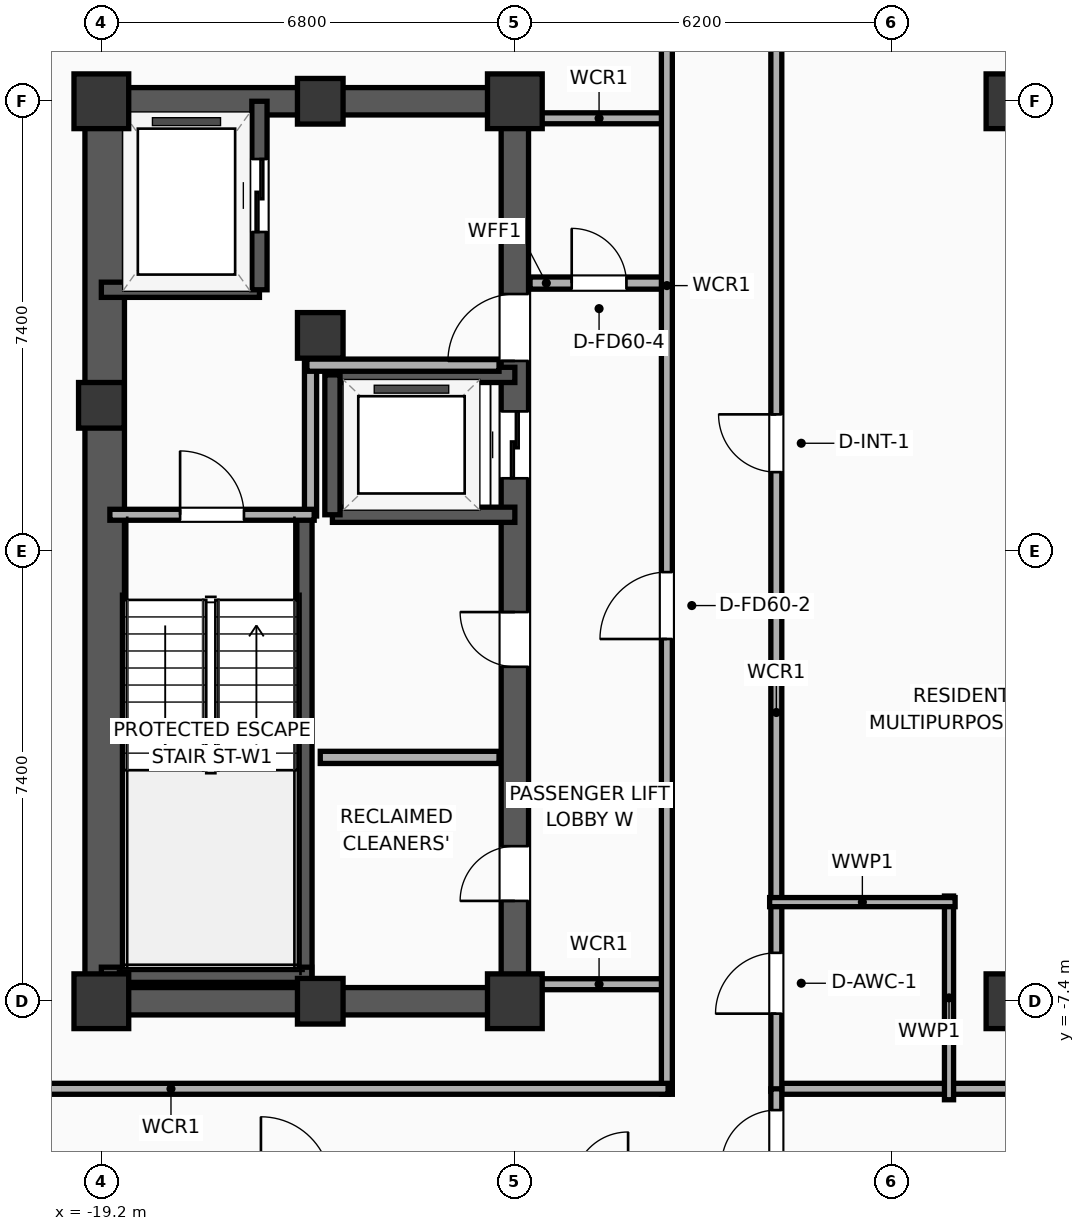
"""IFC4 building model, lengths in metres.
Left out: names, types, materials, properties, quantities, classifications, styles, units other than length and angle.
Written with IfcOpenShell. Run it as: python <this file> out.ifc"""

import sys

from ifc_helpers import new_model, si_unit, direction, frame, frame_2d, origin, origin_2d, place, context, subcontext, project, spatial, rectangle, extrude, element, fill, save


model = new_model("IFC4")
c1 = context("Model", 3, precision=1e-05, world=origin(), true_north=direction((0.0, 1.0)))
c2 = subcontext(c1, "Body", "Model", "MODEL_VIEW")
j1 = project(units=[si_unit("LENGTHUNIT", "METRE"), si_unit("PLANEANGLEUNIT", "RADIAN")], contexts=[c1])
p1 = place(None, origin())
s1 = spatial("IfcSite", under=j1, at=p1, CompositionType="ELEMENT")
p2 = place(p1, origin())
s2 = spatial("IfcBuilding", under=s1, at=p2, CompositionType="ELEMENT")
p3 = place(p2, frame((0.0, 0.0, 250.9)))
s3 = spatial("IfcBuildingStorey", under=s2, at=p3, CompositionType="ELEMENT", Elevation=250.9)
p4 = place(p3, frame((-19.2, -7.4, 0.0), z_axis=(0.0, 0.0, 1.0), x_axis=(1.0, 0.0, 0.0)))
e1 = element("IfcColumn", 1, at=p4, inside=s3, PredefinedType="COLUMN", context=c2, shape_type="SweptSolid", body=[
    extrude(rectangle(XDim=0.9, YDim=0.9, at=origin_2d()), origin(), (0.0, 0.0, 1.0), 3.9),
])
p5 = place(p3, frame((-19.2, 2.4, 0.0), z_axis=(0.0, 0.0, 1.0), x_axis=(1.0, 0.0, 0.0)))
e2 = element("IfcColumn", 2, at=p5, inside=s3, PredefinedType="COLUMN", context=c2, shape_type="SweptSolid", body=[
    extrude(rectangle(XDim=0.75, YDim=0.75, at=origin_2d()), origin(), (0.0, 0.0, 1.0), 3.9),
])
p6 = place(p3, frame((-19.2, 7.4, 0.0), z_axis=(0.0, 0.0, 1.0), x_axis=(1.0, 0.0, 0.0)))
e3 = element("IfcColumn", 3, at=p6, inside=s3, PredefinedType="COLUMN", context=c2, shape_type="SweptSolid", body=[
    extrude(rectangle(XDim=0.9, YDim=0.9, at=origin_2d()), origin(), (0.0, 0.0, 1.0), 3.9),
])
for number, where, z_axis, x_axis in (
    (4, (-15.6, -7.4, 0.0), (0.0, 0.0, 1.0), (1.0, 0.0, 0.0)),
    (5, (-15.6, 7.4, 0.0), (0.0, 0.0, 1.0), (1.0, 0.0, 0.0)),
):
    element("IfcColumn", number, at=place(p3, frame(where, z_axis=z_axis, x_axis=x_axis)), inside=s3, PredefinedType="COLUMN", context=c2, shape_type="SweptSolid", body=[
        extrude(rectangle(XDim=0.75, YDim=0.75, at=origin_2d()), origin(), (0.0, 0.0, 1.0), 3.9),
    ])
p7 = place(p3, frame((-12.4, -7.4, 0.0), z_axis=(0.0, 0.0, 1.0), x_axis=(1.0, 0.0, 0.0)))
e6 = element("IfcColumn", 6, at=p7, inside=s3, PredefinedType="COLUMN", context=c2, shape_type="SweptSolid", body=[
    extrude(rectangle(XDim=0.9, YDim=0.9, at=origin_2d()), origin(), (0.0, 0.0, 1.0), 3.9),
])
p8 = place(p3, frame((-15.6, 3.55, 0.0), z_axis=(0.0, 0.0, 1.0), x_axis=(1.0, 0.0, 0.0)))
e7 = element("IfcColumn", 7, at=p8, inside=s3, PredefinedType="COLUMN", context=c2, shape_type="SweptSolid", body=[
    extrude(rectangle(XDim=0.75, YDim=0.75, at=origin_2d()), origin(), (0.0, 0.0, 1.0), 3.9),
])
p9 = place(p3, frame((-12.4, 7.4, 0.0), z_axis=(0.0, 0.0, 1.0), x_axis=(1.0, 0.0, 0.0)))
e8 = element("IfcColumn", 8, at=p9, inside=s3, PredefinedType="COLUMN", context=c2, shape_type="SweptSolid", body=[
    extrude(rectangle(XDim=0.9, YDim=0.9, at=origin_2d()), origin(), (0.0, 0.0, 1.0), 3.9),
])
for number, where, z_axis, x_axis in (
    (9, (-19.425, -7.4, 0.0), (0.0, 0.0, 1.0), (1.0, 0.0, 0.0)),
    (10, (-19.425, 7.4, 0.0), (0.0, 0.0, 1.0), (1.0, 0.0, 0.0)),
):
    element("IfcWall", number, at=place(p3, frame(where, z_axis=z_axis, x_axis=x_axis)), inside=s3, PredefinedType="SHEAR", context=c2, shape_type="SweptSolid", body=[
        extrude(rectangle(XDim=7.25, YDim=0.45, at=frame_2d((3.625, 0.0))), origin(), (0.0, 0.0, 1.0), 3.5),
    ])
p10 = place(p3, frame((-19.145, -7.4, 0.0), z_axis=(0.0, 0.0, 1.0), x_axis=(0.0, 1.0, 0.0)))
e11 = element("IfcWall", 11, at=p10, inside=s3, PredefinedType="SHEAR", context=c2, shape_type="SweptSolid", body=[
    extrude(rectangle(XDim=14.8, YDim=0.65, at=frame_2d((7.4, 0.0))), origin(), (0.0, 0.0, 1.0), 3.5),
])
p11 = place(p3, frame((-12.4, -7.4, 0.0), z_axis=(0.0, 0.0, 1.0), x_axis=(0.0, 1.0, 0.0)))
e12 = element("IfcWall", 12, at=p11, inside=s3, PredefinedType="SHEAR", context=c2, shape_type="SweptSolid", body=[
    extrude(rectangle(XDim=14.8, YDim=0.45, at=frame_2d((7.4, 0.0))), origin(), (0.0, 0.0, 1.0), 3.5),
])
p12 = place(p11, frame((8.6, 0.0, 0.0)))
e13 = element("IfcOpeningElement", 13, at=p12, cuts=e12, PredefinedType="OPENING", context=c2, shape_type="SweptSolid", body=[
    extrude(rectangle(XDim=1.1, YDim=2.05, at=frame_2d((0.55, 1.025))), frame((0.0, 0.235, 0.0), z_axis=(0.0, -1.0, 0.0), x_axis=(1.0, 0.0, 0.0)), (0.0, 0.0, 1.0), 0.47),
])
p13 = place(p11, frame((10.53, 0.0, 0.0)))
e14 = element("IfcOpeningElement", 14, at=p13, cuts=e12, PredefinedType="OPENING", context=c2, shape_type="SweptSolid", body=[
    extrude(rectangle(XDim=1.1, YDim=2.05, at=frame_2d((0.55, 1.025))), frame((0.0, 0.235, 0.0), z_axis=(0.0, -1.0, 0.0), x_axis=(1.0, 0.0, 0.0)), (0.0, 0.0, 1.0), 0.47),
])
p14 = place(p11, frame((1.65, 0.0, 0.0)))
e15 = element("IfcOpeningElement", 15, at=p14, cuts=e12, PredefinedType="OPENING", context=c2, shape_type="SweptSolid", body=[
    extrude(rectangle(XDim=0.9, YDim=2.05, at=frame_2d((0.45, 1.025))), frame((0.0, 0.235, 0.0), z_axis=(0.0, -1.0, 0.0), x_axis=(1.0, 0.0, 0.0)), (0.0, 0.0, 1.0), 0.47),
])
p15 = place(p11, frame((5.5, 0.0, 0.0)))
e16 = element("IfcOpeningElement", 16, at=p15, cuts=e12, PredefinedType="OPENING", context=c2, shape_type="SweptSolid", body=[
    extrude(rectangle(XDim=0.9, YDim=2.05, at=frame_2d((0.45, 1.025))), frame((0.0, 0.235, 0.0), z_axis=(0.0, -1.0, 0.0), x_axis=(1.0, 0.0, 0.0)), (0.0, 0.0, 1.0), 0.47),
])
p16 = place(p3, frame((-15.86, -7.085, 0.0), z_axis=(0.0, 0.0, 1.0), x_axis=(0.0, 1.0, 0.0)))
e17 = element("IfcWall", 17, at=p16, inside=s3, PredefinedType="SOLIDWALL", context=c2, shape_type="SweptSolid", body=[
    extrude(rectangle(XDim=7.685, YDim=0.25, at=frame_2d((3.843, 0.0))), origin(), (0.0, 0.0, 1.0), 3.5),
])
p17 = place(p3, frame((-19.2, -6.965, 0.0), z_axis=(0.0, 0.0, 1.0), x_axis=(1.0, 0.0, 0.0)))
e18 = element("IfcWall", 18, at=p17, inside=s3, PredefinedType="SOLIDWALL", context=c2, shape_type="SweptSolid", body=[
    extrude(rectangle(XDim=3.46, YDim=0.25, at=frame_2d((1.73, 0.0))), origin(), (0.0, 0.0, 1.0), 3.5),
])
for number, where, z_axis, x_axis in (
    (19, (-4.2, -7.4, 0.0), (0.0, 0.0, 1.0), (1.0, 0.0, 0.0)),
    (20, (-4.2, 7.4, 0.0), (0.0, 0.0, 1.0), (1.0, 0.0, 0.0)),
):
    element("IfcColumn", number, at=place(p3, frame(where, z_axis=z_axis, x_axis=x_axis)), inside=s3, PredefinedType="COLUMN", context=c2, shape_type="SweptSolid", body=[
        extrude(rectangle(XDim=0.9, YDim=0.9, at=origin_2d()), origin(), (0.0, 0.0, 1.0), 3.9),
    ])
p18 = place(p3, frame((-19.2, 4.3, 0.0), z_axis=(0.0, 0.0, 1.0), x_axis=(1.0, 0.0, 0.0)))
e21 = element("IfcWall", 21, at=p18, inside=s3, PredefinedType="SOLIDWALL", context=c2, shape_type="SweptSolid", body=[
    extrude(rectangle(XDim=2.6, YDim=0.25, at=frame_2d((1.3, 0.0))), origin(), (0.0, 0.0, 1.0), 3.5),
])
p19 = place(p3, frame((-16.6, 4.3, 0.0), z_axis=(0.0, 0.0, 1.0), x_axis=(0.0, 1.0, 0.0)))
e22 = element("IfcWall", 22, at=p19, inside=s3, PredefinedType="SOLIDWALL", context=c2, shape_type="SweptSolid", body=[
    extrude(rectangle(XDim=3.1, YDim=0.25, at=frame_2d((1.55, 0.0))), origin(), (0.0, 0.0, 1.0), 3.5),
])
p20 = place(p19, frame((0.95, 0.0, 0.0)))
e23 = element("IfcOpeningElement", 23, at=p20, cuts=e22, PredefinedType="OPENING", context=c2, shape_type="SweptSolid", body=[
    extrude(rectangle(XDim=1.2, YDim=2.05, at=frame_2d((0.6, 1.025))), frame((0.0, 0.135, 0.0), z_axis=(0.0, -1.0, 0.0), x_axis=(1.0, 0.0, 0.0)), (0.0, 0.0, 1.0), 0.27),
])
for number, where, z_axis, x_axis in (
    (24, (-15.4, 0.6, 0.0), (0.0, 0.0, 1.0), (1.0, 0.0, 0.0)),
    (25, (-12.4, 2.9, 0.0), (0.0, 0.0, 1.0), (-1.0, 0.0, 0.0)),
):
    element("IfcWall", number, at=place(p3, frame(where, z_axis=z_axis, x_axis=x_axis)), inside=s3, PredefinedType="SOLIDWALL", context=c2, shape_type="SweptSolid", body=[
        extrude(rectangle(XDim=3.0, YDim=0.25, at=frame_2d((1.5, 0.0))), origin(), (0.0, 0.0, 1.0), 3.5),
    ])
p21 = place(p3, frame((-15.4, 2.9, 0.0), z_axis=(0.0, 0.0, 1.0), x_axis=(0.0, -1.0, 0.0)))
e26 = element("IfcWall", 26, at=p21, inside=s3, PredefinedType="SOLIDWALL", context=c2, shape_type="SweptSolid", body=[
    extrude(rectangle(XDim=2.3, YDim=0.25, at=frame_2d((1.15, 0.0))), origin(), (0.0, 0.0, 1.0), 3.5),
])
p22 = place(p3, frame((-15.76, 0.58, 0.0), z_axis=(0.0, 0.0, 1.0), x_axis=(0.0, 1.0, 0.0)))
e27 = element("IfcWall", 27, at=p22, inside=s3, PredefinedType="PARTITIONING", context=c2, shape_type="SweptSolid", body=[
    extrude(rectangle(XDim=2.52, YDim=0.2, at=frame_2d((1.26, 0.0))), origin(), (0.0, 0.0, 1.0), 3.5),
])
p23 = place(p3, frame((-15.82, 3.06, 0.0), z_axis=(0.0, 0.0, 1.0), x_axis=(1.0, 0.0, 0.0)))
e28 = element("IfcWall", 28, at=p23, inside=s3, PredefinedType="PARTITIONING", context=c2, shape_type="SweptSolid", body=[
    extrude(rectangle(XDim=3.16, YDim=0.2, at=frame_2d((1.58, 0.0))), origin(), (0.0, 0.0, 1.0), 3.5),
])
p24 = place(p3, frame((-19.06, 0.6, 0.0), z_axis=(0.0, 0.0, 1.0), x_axis=(1.0, 0.0, 0.0)))
e29 = element("IfcWall", 29, at=p24, inside=s3, PredefinedType="PARTITIONING", context=c2, shape_type="SweptSolid", body=[
    extrude(rectangle(XDim=3.36, YDim=0.18, at=frame_2d((1.68, 0.0))), origin(), (0.0, 0.0, 1.0), 3.5),
])
p25 = place(p24, frame((1.155, 0.0, 0.0)))
e30 = element("IfcOpeningElement", 30, at=p25, cuts=e29, PredefinedType="OPENING", context=c2, shape_type="SweptSolid", body=[
    extrude(rectangle(XDim=1.05, YDim=2.05, at=frame_2d((0.525, 1.025))), frame((0.0, 0.1, 0.0), z_axis=(0.0, -1.0, 0.0), x_axis=(1.0, 0.0, 0.0)), (0.0, 0.0, 1.0), 0.2),
])
p26 = place(p3, frame((-15.6, -3.39, 0.0), z_axis=(0.0, 0.0, 1.0), x_axis=(1.0, 0.0, 0.0)))
e31 = element("IfcWall", 31, at=p26, inside=s3, PredefinedType="PARTITIONING", context=c2, shape_type="SweptSolid", body=[
    extrude(rectangle(XDim=2.94, YDim=0.2, at=frame_2d((1.47, 0.0))), origin(), (0.0, 0.0, 1.0), 3.5),
])
p27 = place(p3, frame((-12.15, 4.41, 0.0), z_axis=(0.0, 0.0, 1.0), x_axis=(1.0, 0.0, 0.0)))
e32 = element("IfcWall", 32, at=p27, inside=s3, PredefinedType="PARTITIONING", context=c2, shape_type="SweptSolid", body=[
    extrude(rectangle(XDim=2.27, YDim=0.2, at=frame_2d((1.135, 0.0))), origin(), (0.0, 0.0, 1.0), 3.5),
])
p28 = place(p27, frame((0.685, 0.0, 0.0)))
e33 = element("IfcOpeningElement", 33, at=p28, cuts=e32, PredefinedType="OPENING", context=c2, shape_type="SweptSolid", body=[
    extrude(rectangle(XDim=0.9, YDim=2.05, at=frame_2d((0.45, 1.025))), frame((0.0, 0.11, 0.0), z_axis=(0.0, -1.0, 0.0), x_axis=(1.0, 0.0, 0.0)), (0.0, 0.0, 1.0), 0.22),
])
for number, where, z_axis, x_axis in (
    (34, (-12.15, 7.12, 0.0), (0.0, 0.0, 1.0), (1.0, 0.0, 0.0)),
    (35, (-12.15, -7.12, 0.0), (0.0, 0.0, 1.0), (1.0, 0.0, 0.0)),
):
    element("IfcWall", number, at=place(p3, frame(where, z_axis=z_axis, x_axis=x_axis)), inside=s3, PredefinedType="PARTITIONING", context=c2, shape_type="SweptSolid", body=[
        extrude(rectangle(XDim=2.27, YDim=0.18, at=frame_2d((1.135, 0.0))), origin(), (0.0, 0.0, 1.0), 2.54),
    ])
p29 = place(p3, frame((-9.9, -8.93, 0.0), z_axis=(0.0, 0.0, 1.0), x_axis=(0.0, 1.0, 0.0)))
e36 = element("IfcWall", 36, at=p29, inside=s3, PredefinedType="PARTITIONING", context=c2, shape_type="SweptSolid", body=[
    extrude(rectangle(XDim=17.86, YDim=0.18, at=frame_2d((8.93, 0.0))), origin(), (0.0, 0.0, 1.0), 3.5),
])
p30 = place(p29, frame((7.487, 0.0, 0.0)))
e37 = element("IfcOpeningElement", 37, at=p30, cuts=e36, PredefinedType="OPENING", context=c2, shape_type="SweptSolid", body=[
    extrude(rectangle(XDim=1.1, YDim=2.05, at=frame_2d((0.55, 1.025))), frame((0.0, 0.1, 0.0), z_axis=(0.0, -1.0, 0.0), x_axis=(1.0, 0.0, 0.0)), (0.0, 0.0, 1.0), 0.2),
])
p31 = place(p3, frame((-26.23, -8.84, 0.0), z_axis=(0.0, 0.0, 1.0), x_axis=(1.0, 0.0, 0.0)))
e38 = element("IfcWall", 38, at=p31, inside=s3, PredefinedType="PARTITIONING", context=c2, shape_type="SweptSolid", body=[
    extrude(rectangle(XDim=16.35, YDim=0.18, at=frame_2d((8.175, 0.0))), origin(), (0.0, 0.0, 1.0), 3.5),
])
p32 = place(p3, frame((-8.15, -8.84, 0.0), z_axis=(0.0, 0.0, 1.0), x_axis=(1.0, 0.0, 0.0)))
e39 = element("IfcWall", 39, at=p32, inside=s3, PredefinedType="PARTITIONING", context=c2, shape_type="SweptSolid", body=[
    extrude(rectangle(XDim=16.3, YDim=0.18, at=frame_2d((8.15, 0.0))), origin(), (0.0, 0.0, 1.0), 3.5),
])
p33 = place(p3, frame((-8.1, -8.88, 0.0), z_axis=(0.0, 0.0, 1.0), x_axis=(0.0, 1.0, 0.0)))
e40 = element("IfcWall", 40, at=p33, inside=s3, PredefinedType="PARTITIONING", context=c2, shape_type="SweptSolid", body=[
    extrude(rectangle(XDim=17.76, YDim=0.18, at=frame_2d((8.88, 0.0))), origin(), (0.0, 0.0, 1.0), 3.5),
])
p34 = place(p33, frame((1.276, 0.0, 0.0)))
e41 = element("IfcOpeningElement", 41, at=p34, cuts=e40, PredefinedType="OPENING", context=c2, shape_type="SweptSolid", body=[
    extrude(rectangle(XDim=1.0, YDim=2.05, at=frame_2d((0.5, 1.025))), frame((0.0, 0.1, 0.0), z_axis=(0.0, -1.0, 0.0), x_axis=(1.0, 0.0, 0.0)), (0.0, 0.0, 1.0), 0.2),
])
p35 = place(p33, frame((10.181, 0.0, 0.0)))
e42 = element("IfcOpeningElement", 42, at=p35, cuts=e40, PredefinedType="OPENING", context=c2, shape_type="SweptSolid", body=[
    extrude(rectangle(XDim=0.95, YDim=2.05, at=frame_2d((0.475, 1.025))), frame((0.0, 0.1, 0.0), z_axis=(0.0, -1.0, 0.0), x_axis=(1.0, 0.0, 0.0)), (0.0, 0.0, 1.0), 0.2),
])
p36 = place(p3, frame((-5.26, -9.02, 0.0), z_axis=(0.0, 0.0, 1.0), x_axis=(0.0, 1.0, 0.0)))
e43 = element("IfcWall", 43, at=p36, inside=s3, PredefinedType="PLUMBINGWALL", context=c2, shape_type="SweptSolid", body=[
    extrude(rectangle(XDim=3.35, YDim=0.15, at=frame_2d((1.675, 0.0))), origin(), (0.0, 0.0, 1.0), 3.5),
])
p37 = place(p3, frame((-8.21, -5.77, 0.0), z_axis=(0.0, 0.0, 1.0), x_axis=(1.0, 0.0, 0.0)))
e44 = element("IfcWall", 44, at=p37, inside=s3, PredefinedType="PLUMBINGWALL", context=c2, shape_type="SweptSolid", body=[
    extrude(rectangle(XDim=3.05, YDim=0.15, at=frame_2d((1.525, 0.0))), origin(), (0.0, 0.0, 1.0), 3.5),
])
p38 = place(p3, frame((-8.1, -18.83, 0.0), z_axis=(0.0, 0.0, 1.0), x_axis=(0.0, 1.0, 0.0)))
e45 = element("IfcWall", 45, at=p38, inside=s3, PredefinedType="PARTITIONING", context=c2, shape_type="SweptSolid", body=[
    extrude(rectangle(XDim=9.99, YDim=0.18, at=frame_2d((4.995, 0.0))), origin(), (0.0, 0.0, 1.0), 3.5),
])
p39 = place(p38, frame((8.74, 0.0, 0.0)))
e46 = element("IfcOpeningElement", 46, at=p39, cuts=e45, PredefinedType="OPENING", context=c2, shape_type="SweptSolid", body=[
    extrude(rectangle(XDim=0.9, YDim=2.05, at=frame_2d((0.45, 1.025))), frame((0.0, 0.1, 0.0), z_axis=(0.0, -1.0, 0.0), x_axis=(1.0, 0.0, 0.0)), (0.0, 0.0, 1.0), 0.2),
])
p40 = place(p20, origin())
e47 = element("IfcDoor", 47, at=p40, inside=s3, OperationType="SLIDING_TO_LEFT", PredefinedType="DOOR", context=c2, shape_type="SweptSolid", body=[
    extrude(rectangle(XDim=1.2, YDim=2.05, at=frame_2d((0.6, 1.025))), frame((0.0, 0.025, 0.0), z_axis=(0.0, -1.0, 0.0), x_axis=(1.0, 0.0, 0.0)), (0.0, 0.0, 1.0), 0.05),
])
fill(e23, e47)
p41 = place(p12, origin())
e48 = element("IfcDoor", 48, at=p41, inside=s3, OperationType="SLIDING_TO_LEFT", PredefinedType="DOOR", context=c2, shape_type="SweptSolid", body=[
    extrude(rectangle(XDim=1.1, YDim=2.05, at=frame_2d((0.55, 1.025))), frame((0.0, 0.025, 0.0), z_axis=(0.0, -1.0, 0.0), x_axis=(1.0, 0.0, 0.0)), (0.0, 0.0, 1.0), 0.05),
])
fill(e13, e48)
p42 = place(p25, origin())
e49 = element("IfcDoor", 49, at=p42, inside=s3, OperationType="SINGLE_SWING_LEFT", PredefinedType="DOOR", context=c2, shape_type="SweptSolid", body=[
    extrude(rectangle(XDim=1.05, YDim=2.05, at=frame_2d((0.525, 1.025))), frame((0.0, 0.025, 0.0), z_axis=(0.0, -1.0, 0.0), x_axis=(1.0, 0.0, 0.0)), (0.0, 0.0, 1.0), 0.05),
])
fill(e30, e49)
p43 = place(p28, origin())
e50 = element("IfcDoor", 50, at=p43, inside=s3, OperationType="SINGLE_SWING_LEFT", PredefinedType="DOOR", context=c2, shape_type="SweptSolid", body=[
    extrude(rectangle(XDim=0.9, YDim=2.05, at=frame_2d((0.45, 1.025))), frame((0.0, 0.025, 0.0), z_axis=(0.0, -1.0, 0.0), x_axis=(1.0, 0.0, 0.0)), (0.0, 0.0, 1.0), 0.05),
])
fill(e33, e50)
p44 = place(p30, origin())
e51 = element("IfcDoor", 51, at=p44, inside=s3, OperationType="SINGLE_SWING_LEFT", PredefinedType="DOOR", context=c2, shape_type="SweptSolid", body=[
    extrude(rectangle(XDim=1.1, YDim=2.05, at=frame_2d((0.55, 1.025))), frame((0.0, 0.025, 0.0), z_axis=(0.0, -1.0, 0.0), x_axis=(1.0, 0.0, 0.0)), (0.0, 0.0, 1.0), 0.05),
])
fill(e37, e51)
p45 = place(p34, origin())
e52 = element("IfcDoor", 52, at=p45, inside=s3, OperationType="SINGLE_SWING_LEFT", PredefinedType="DOOR", context=c2, shape_type="SweptSolid", body=[
    extrude(rectangle(XDim=1.0, YDim=2.05, at=frame_2d((0.5, 1.025))), frame((0.0, 0.025, 0.0), z_axis=(0.0, -1.0, 0.0), x_axis=(1.0, 0.0, 0.0)), (0.0, 0.0, 1.0), 0.05),
])
fill(e41, e52)
p46 = place(p35, origin())
e53 = element("IfcDoor", 53, at=p46, inside=s3, OperationType="SINGLE_SWING_RIGHT", PredefinedType="DOOR", context=c2, shape_type="SweptSolid", body=[
    extrude(rectangle(XDim=0.95, YDim=2.05, at=frame_2d((0.475, 1.025))), frame((0.0, 0.025, 0.0), z_axis=(0.0, -1.0, 0.0), x_axis=(1.0, 0.0, 0.0)), (0.0, 0.0, 1.0), 0.05),
])
fill(e42, e53)
p47 = place(p39, origin())
e54 = element("IfcDoor", 54, at=p47, inside=s3, OperationType="SINGLE_SWING_LEFT", PredefinedType="DOOR", context=c2, shape_type="SweptSolid", body=[
    extrude(rectangle(XDim=0.9, YDim=2.05, at=frame_2d((0.45, 1.025))), frame((0.0, 0.025, 0.0), z_axis=(0.0, -1.0, 0.0), x_axis=(1.0, 0.0, 0.0)), (0.0, 0.0, 1.0), 0.05),
])
fill(e46, e54)
p48 = place(p13, origin())
e55 = element("IfcDoor", 55, at=p48, inside=s3, OperationType="SINGLE_SWING_LEFT", PredefinedType="DOOR", context=c2, shape_type="SweptSolid", body=[
    extrude(rectangle(XDim=1.1, YDim=2.05, at=frame_2d((0.55, 1.025))), frame((0.0, 0.025, 0.0), z_axis=(0.0, -1.0, 0.0), x_axis=(1.0, 0.0, 0.0)), (0.0, 0.0, 1.0), 0.05),
])
fill(e14, e55)
p49 = place(p14, origin())
e56 = element("IfcDoor", 56, at=p49, inside=s3, OperationType="SINGLE_SWING_LEFT", PredefinedType="DOOR", context=c2, shape_type="SweptSolid", body=[
    extrude(rectangle(XDim=0.9, YDim=2.05, at=frame_2d((0.45, 1.025))), frame((0.0, 0.025, 0.0), z_axis=(0.0, -1.0, 0.0), x_axis=(1.0, 0.0, 0.0)), (0.0, 0.0, 1.0), 0.05),
])
fill(e15, e56)
p50 = place(p15, origin())
e57 = element("IfcDoor", 57, at=p50, inside=s3, OperationType="SINGLE_SWING_RIGHT", PredefinedType="DOOR", context=c2, shape_type="SweptSolid", body=[
    extrude(rectangle(XDim=0.9, YDim=2.05, at=frame_2d((0.45, 1.025))), frame((0.0, 0.025, 0.0), z_axis=(0.0, -1.0, 0.0), x_axis=(1.0, 0.0, 0.0)), (0.0, 0.0, 1.0), 0.05),
])
fill(e16, e57)
save(model, sys.argv[1])
